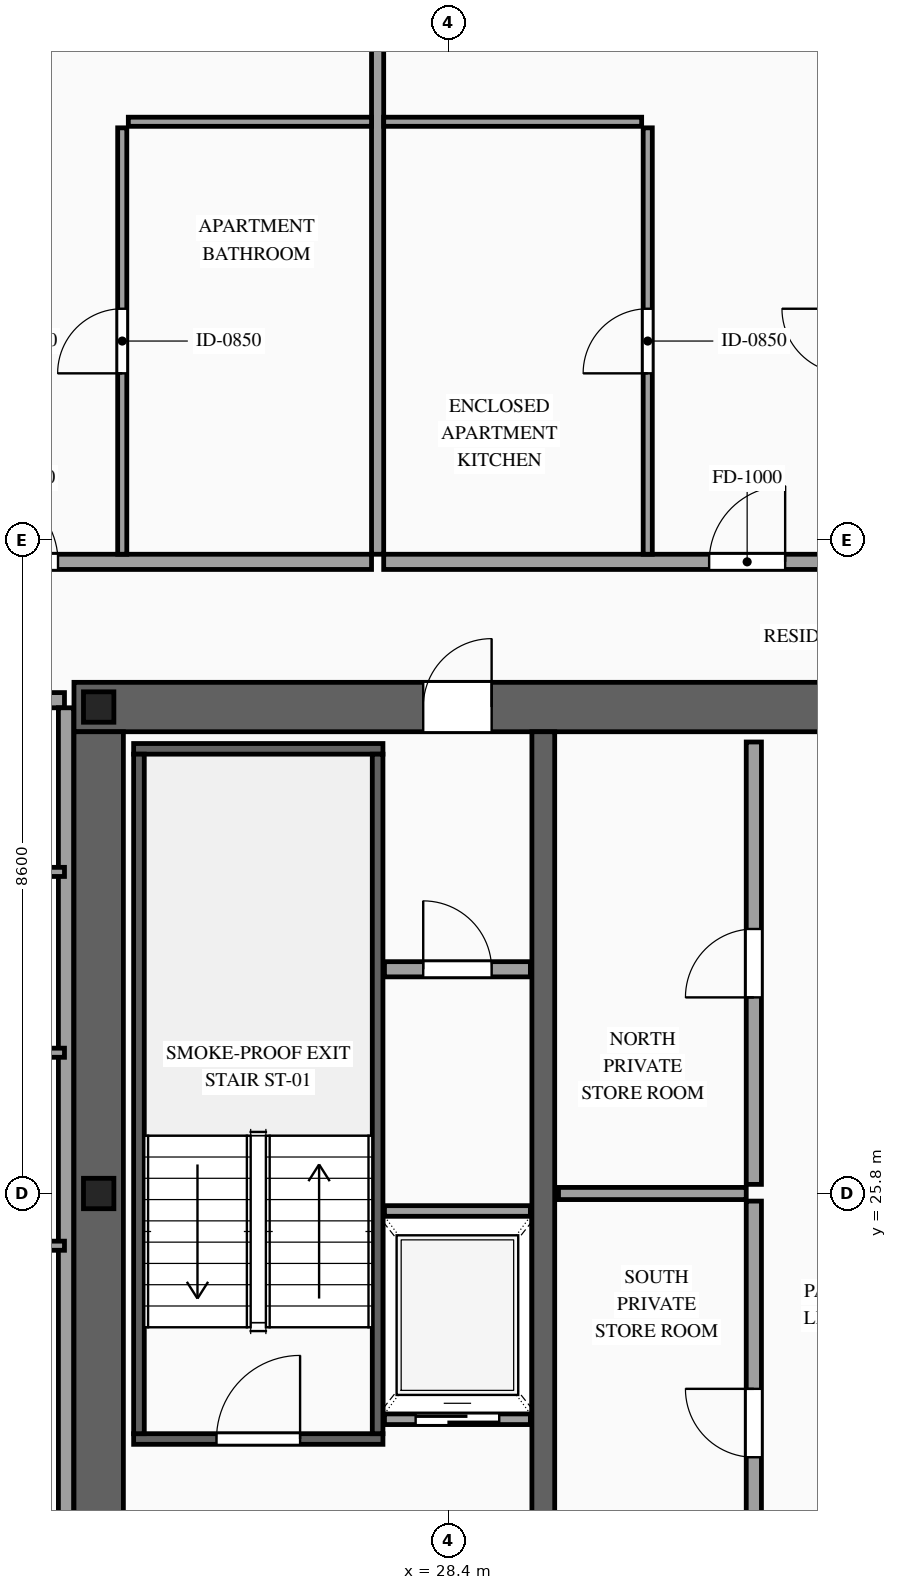
"""IFC4 building model, lengths in metres.
Left out: names, types, materials, properties, quantities, classifications, styles, units other than length and angle.
Written with IfcOpenShell. Run it as: python <this file> out.ifc"""

import sys

from ifc_helpers import new_model, si_unit, direction, frame, frame_2d, origin, origin_2d, place, context, subcontext, project, spatial, rectangle, i_section, extrude, source, transform, mapped, element, fill, save


model = new_model("IFC4")
c1 = context("Model", 3, precision=1e-05, world=origin(), true_north=direction((0.0, 1.0)))
c2 = subcontext(c1, "Body", "Model", "MODEL_VIEW")
j1 = project(units=[si_unit("LENGTHUNIT", "METRE"), si_unit("PLANEANGLEUNIT", "RADIAN")], contexts=[c1])
p1 = place(None, origin())
s1 = spatial("IfcSite", under=j1, at=p1, CompositionType="ELEMENT")
p2 = place(p1, origin())
s2 = spatial("IfcBuilding", under=s1, at=p2, CompositionType="ELEMENT")
p3 = place(p2, frame((0.0, 0.0, 184.5)))
s3 = spatial("IfcBuildingStorey", under=s2, at=p3, CompositionType="ELEMENT", Elevation=184.5)
p4 = place(p3, frame((23.475, 32.2, 0.0), z_axis=(0.0, 0.0, 1.0), x_axis=(1.0, 0.0, 0.0)))
e1 = element("IfcWall", 1, at=p4, inside=s3, PredefinedType="SHEAR", context=c2, shape_type="SweptSolid", body=[
    extrude(rectangle(XDim=27.05, YDim=0.65, at=frame_2d((13.525, 0.0))), origin(), (0.0, 0.0, 1.0), 3.5),
])
p5 = place(p4, frame((4.595, 0.0, 0.0)))
e2 = element("IfcOpeningElement", 2, at=p5, cuts=e1, PredefinedType="OPENING", context=c2, shape_type="SweptSolid", body=[
    extrude(rectangle(XDim=0.9, YDim=2.15, at=frame_2d((0.45, 1.075))), frame((0.0, 0.34, 0.0), z_axis=(0.0, -1.0, 0.0), x_axis=(1.0, 0.0, 0.0)), (0.0, 0.0, 1.0), 0.68),
])
p6 = place(p4, frame((9.875, 0.0, 0.0)))
e3 = element("IfcOpeningElement", 3, at=p6, cuts=e1, PredefinedType="OPENING", context=c2, shape_type="SweptSolid", body=[
    extrude(rectangle(XDim=1.1, YDim=2.2, at=frame_2d((0.55, 1.1))), frame((0.0, 0.34, 0.0), z_axis=(0.0, -1.0, 0.0), x_axis=(1.0, 0.0, 0.0)), (0.0, 0.0, 1.0), 0.68),
])
p7 = place(p4, frame((15.725, 0.0, 0.0)))
e4 = element("IfcOpeningElement", 4, at=p7, cuts=e1, PredefinedType="OPENING", context=c2, shape_type="SweptSolid", body=[
    extrude(rectangle(XDim=1.1, YDim=2.2, at=frame_2d((0.55, 1.1))), frame((0.0, 0.34, 0.0), z_axis=(0.0, -1.0, 0.0), x_axis=(1.0, 0.0, 0.0)), (0.0, 0.0, 1.0), 0.68),
])
p8 = place(p4, frame((19.695, 0.0, 0.0)))
e5 = element("IfcOpeningElement", 5, at=p8, cuts=e1, PredefinedType="OPENING", context=c2, shape_type="SweptSolid", body=[
    extrude(rectangle(XDim=0.9, YDim=2.15, at=frame_2d((0.45, 1.075))), frame((0.0, 0.34, 0.0), z_axis=(0.0, -1.0, 0.0), x_axis=(1.0, 0.0, 0.0)), (0.0, 0.0, 1.0), 0.68),
])
m1 = source(origin(), c2, "Body", "SweptSolid", [
    extrude(rectangle(XDim=12.15, YDim=0.65, at=frame_2d((6.075, 0.0))), origin(), (0.0, 0.0, 1.0), 3.5),
])
p9 = place(p3, frame((23.8, 19.725, 0.0), z_axis=(0.0, 0.0, 1.0), x_axis=(0.0, 1.0, 0.0)))
e6 = element("IfcWall", 6, at=p9, inside=s3, PredefinedType="SHEAR", context=c2, shape_type="MappedRepresentation", body=[
    mapped(m1, transform((0.0, 0.0, 0.0), scale=1.0)),
])
m2 = source(origin(), c2, "Body", "SweptSolid", [
    extrude(rectangle(XDim=12.15, YDim=0.3, at=frame_2d((6.075, 0.0))), origin(), (0.0, 0.0, 1.0), 3.5),
])
p10 = place(p3, frame((29.65, 19.725, 0.0), z_axis=(0.0, 0.0, 1.0), x_axis=(0.0, 1.0, 0.0)))
e7 = element("IfcWall", 7, at=p10, inside=s3, PredefinedType="SOLIDWALL", context=c2, shape_type="MappedRepresentation", body=[
    mapped(m2, transform((0.0, 0.0, 0.0), scale=1.0)),
])
m3 = source(origin(), c2, "Body", "SweptSolid", [
    extrude(i_section(OverallWidth=0.4, OverallDepth=0.4, WebThickness=0.013, FlangeThickness=0.021, at=origin_2d()), origin(), (0.0, 0.0, 1.0), 3.5),
])
for number, where, z_axis, x_axis in (
    (8, (23.8, 25.8, 0.0), (0.0, 0.0, 1.0), (1.0, 0.0, 0.0)),
    (9, (23.8, 32.2, 0.0), (0.0, 0.0, 1.0), (1.0, 0.0, 0.0)),
):
    element("IfcColumn", number, at=place(p3, frame(where, z_axis=z_axis, x_axis=x_axis)), inside=s3, PredefinedType="COLUMN", context=c2, shape_type="MappedRepresentation", body=[
        mapped(m3, transform((0.0, 0.0, 0.0), scale=1.0)),
    ])
p11 = place(p3, frame((27.56, 22.83, 0.0), z_axis=(0.0, 0.0, 1.0), x_axis=(1.0, 0.0, 0.0)))
e10 = element("IfcWall", 10, at=p11, inside=s3, PredefinedType="SOLIDWALL", context=c2, shape_type="SweptSolid", body=[
    extrude(rectangle(XDim=1.92, YDim=0.14, at=frame_2d((0.96, 0.0))), origin(), (0.0, 0.0, 1.0), 3.28),
])
p12 = place(p11, frame((0.41, 0.0, 0.0)))
e11 = element("IfcOpeningElement", 11, at=p12, cuts=e10, PredefinedType="OPENING", context=c2, shape_type="SweptSolid", body=[
    extrude(rectangle(XDim=1.1, YDim=2.2, at=frame_2d((0.55, 1.1))), frame((0.0, 0.085, 0.0), z_axis=(0.0, -1.0, 0.0), x_axis=(1.0, 0.0, 0.0)), (0.0, 0.0, 1.0), 0.17),
])
m4 = source(origin(), c2, "Body", "SweptSolid", [
    extrude(rectangle(XDim=1.92, YDim=0.14, at=frame_2d((0.96, 0.0))), origin(), (0.0, 0.0, 1.0), 3.28),
])
p13 = place(p3, frame((27.56, 25.57, 0.0), z_axis=(0.0, 0.0, 1.0), x_axis=(1.0, 0.0, 0.0)))
e12 = element("IfcWall", 12, at=p13, inside=s3, PredefinedType="SOLIDWALL", context=c2, shape_type="MappedRepresentation", body=[
    mapped(m4, transform((0.0, 0.0, 0.0), scale=1.0)),
])
p14 = place(p3, frame((24.26, 22.57, 0.0), z_axis=(0.0, 0.0, 1.0), x_axis=(1.0, 0.0, 0.0)))
e13 = element("IfcWall", 13, at=p14, inside=s3, PredefinedType="SOLIDWALL", context=c2, shape_type="SweptSolid", body=[
    extrude(rectangle(XDim=3.28, YDim=0.14, at=frame_2d((1.64, 0.0))), origin(), (0.0, 0.0, 1.0), 3.28),
])
p15 = place(p14, frame((1.09, 0.0, 0.0)))
e14 = element("IfcOpeningElement", 14, at=p15, cuts=e13, PredefinedType="OPENING", context=c2, shape_type="SweptSolid", body=[
    extrude(rectangle(XDim=1.1, YDim=2.2, at=frame_2d((0.55, 1.1))), frame((0.0, 0.085, 0.0), z_axis=(0.0, -1.0, 0.0), x_axis=(1.0, 0.0, 0.0)), (0.0, 0.0, 1.0), 0.17),
])
m5 = source(origin(), c2, "Body", "SweptSolid", [
    extrude(rectangle(XDim=3.28, YDim=0.14, at=frame_2d((1.64, 0.0))), origin(), (0.0, 0.0, 1.0), 3.28),
])
p16 = place(p3, frame((24.26, 31.65, 0.0), z_axis=(0.0, 0.0, 1.0), x_axis=(1.0, 0.0, 0.0)))
e15 = element("IfcWall", 15, at=p16, inside=s3, PredefinedType="SOLIDWALL", context=c2, shape_type="MappedRepresentation", body=[
    mapped(m5, transform((0.0, 0.0, 0.0), scale=1.0)),
])
m6 = source(origin(), c2, "Body", "SweptSolid", [
    extrude(rectangle(XDim=8.94, YDim=0.14, at=frame_2d((4.47, 0.0))), origin(), (0.0, 0.0, 1.0), 3.28),
])
for number, where, z_axis, x_axis in (
    (16, (24.33, 22.64, 0.0), (0.0, 0.0, 1.0), (0.0, 1.0, 0.0)),
    (17, (27.47, 22.64, 0.0), (0.0, 0.0, 1.0), (0.0, 1.0, 0.0)),
):
    element("IfcWall", number, at=place(p3, frame(where, z_axis=z_axis, x_axis=x_axis)), inside=s3, PredefinedType="SOLIDWALL", context=c2, shape_type="MappedRepresentation", body=[
        mapped(m6, transform((0.0, 0.0, 0.0), scale=1.0)),
    ])
p17 = place(p3, frame((27.56, 28.75, 0.0), z_axis=(0.0, 0.0, 1.0), x_axis=(1.0, 0.0, 0.0)))
e18 = element("IfcWall", 18, at=p17, inside=s3, PredefinedType="PARTITIONING", context=c2, shape_type="SweptSolid", body=[
    extrude(rectangle(XDim=1.92, YDim=0.2, at=frame_2d((0.96, 0.0))), origin(), (0.0, 0.0, 1.0), 3.28),
])
p18 = place(p17, frame((0.51, 0.0, 0.0)))
e19 = element("IfcOpeningElement", 19, at=p18, cuts=e18, PredefinedType="OPENING", context=c2, shape_type="SweptSolid", body=[
    extrude(rectangle(XDim=0.9, YDim=2.15, at=frame_2d((0.45, 1.075))), frame((0.0, 0.115, 0.0), z_axis=(0.0, -1.0, 0.0), x_axis=(1.0, 0.0, 0.0)), (0.0, 0.0, 1.0), 0.23),
])
p19 = place(p3, frame((32.42, 19.86, 0.0), z_axis=(0.0, 0.0, 1.0), x_axis=(0.0, 1.0, 0.0)))
e20 = element("IfcWall", 20, at=p19, inside=s3, PredefinedType="PARTITIONING", context=c2, shape_type="SweptSolid", body=[
    extrude(rectangle(XDim=5.84, YDim=0.2, at=frame_2d((2.92, 0.0))), origin(), (0.0, 0.0, 1.0), 3.28),
])
p20 = place(p19, frame((2.47, 0.0, 0.0)))
e21 = element("IfcOpeningElement", 21, at=p20, cuts=e20, PredefinedType="OPENING", context=c2, shape_type="SweptSolid", body=[
    extrude(rectangle(XDim=0.9, YDim=2.15, at=frame_2d((0.45, 1.075))), frame((0.0, 0.115, 0.0), z_axis=(0.0, -1.0, 0.0), x_axis=(1.0, 0.0, 0.0)), (0.0, 0.0, 1.0), 0.23),
])
p21 = place(p3, frame((32.42, 25.92, 0.0), z_axis=(0.0, 0.0, 1.0), x_axis=(0.0, 1.0, 0.0)))
e22 = element("IfcWall", 22, at=p21, inside=s3, PredefinedType="PARTITIONING", context=c2, shape_type="SweptSolid", body=[
    extrude(rectangle(XDim=5.82, YDim=0.2, at=frame_2d((2.91, 0.0))), origin(), (0.0, 0.0, 1.0), 3.28),
])
p22 = place(p21, frame((2.46, 0.0, 0.0)))
e23 = element("IfcOpeningElement", 23, at=p22, cuts=e22, PredefinedType="OPENING", context=c2, shape_type="SweptSolid", body=[
    extrude(rectangle(XDim=0.9, YDim=2.15, at=frame_2d((0.45, 1.075))), frame((0.0, 0.115, 0.0), z_axis=(0.0, -1.0, 0.0), x_axis=(1.0, 0.0, 0.0)), (0.0, 0.0, 1.0), 0.23),
])
m7 = source(origin(), c2, "Body", "SweptSolid", [
    extrude(rectangle(XDim=2.47, YDim=0.16, at=frame_2d((1.235, 0.0))), origin(), (0.0, 0.0, 1.0), 3.28),
])
p23 = place(p3, frame((29.85, 25.8, 0.0), z_axis=(0.0, 0.0, 1.0), x_axis=(1.0, 0.0, 0.0)))
e24 = element("IfcWall", 24, at=p23, inside=s3, PredefinedType="PARTITIONING", context=c2, shape_type="MappedRepresentation", body=[
    mapped(m7, transform((0.0, 0.0, 0.0), scale=1.0)),
])
p24 = place(p3, frame((17.94, 34.11, 0.0), z_axis=(0.0, 0.0, 1.0), x_axis=(1.0, 0.0, 0.0)))
e25 = element("IfcWall", 25, at=p24, inside=s3, PredefinedType="PARTITIONING", context=c2, shape_type="SweptSolid", body=[
    extrude(rectangle(XDim=9.45, YDim=0.2, at=frame_2d((4.725, 0.0))), origin(), (0.0, 0.0, 1.0), 3.28),
])
p25 = place(p24, frame((4.325, 0.0, 0.0)))
e26 = element("IfcOpeningElement", 26, at=p25, cuts=e25, PredefinedType="OPENING", context=c2, shape_type="SweptSolid", body=[
    extrude(rectangle(XDim=1.0, YDim=2.2, at=frame_2d((0.5, 1.1))), frame((0.0, 0.115, 0.0), z_axis=(0.0, -1.0, 0.0), x_axis=(1.0, 0.0, 0.0)), (0.0, 0.0, 1.0), 0.23),
])
m8 = source(origin(), c2, "Body", "SweptSolid", [
    extrude(rectangle(XDim=13.54, YDim=0.16, at=frame_2d((6.77, 0.0))), origin(), (0.0, 0.0, 1.0), 3.28),
])
p26 = place(p3, frame((27.47, 34.21, 0.0), z_axis=(0.0, 0.0, 1.0), x_axis=(0.0, 1.0, 0.0)))
e27 = element("IfcWall", 27, at=p26, inside=s3, PredefinedType="PARTITIONING", context=c2, shape_type="MappedRepresentation", body=[
    mapped(m8, transform((0.0, 0.0, 0.0), scale=1.0)),
])
m9 = source(origin(), c2, "Body", "SweptSolid", [
    extrude(rectangle(XDim=3.2, YDim=0.12, at=frame_2d((1.6, 0.0))), origin(), (0.0, 0.0, 1.0), 2.875),
])
p27 = place(p3, frame((24.19, 39.9, 0.0), z_axis=(0.0, 0.0, 1.0), x_axis=(1.0, 0.0, 0.0)))
e28 = element("IfcWall", 28, at=p27, inside=s3, PredefinedType="PARTITIONING", context=c2, shape_type="MappedRepresentation", body=[
    mapped(m9, transform((0.0, 0.0, 0.0), scale=1.0)),
])
p28 = place(p3, frame((24.11, 34.21, 0.0), z_axis=(0.0, 0.0, 1.0), x_axis=(0.0, 1.0, 0.0)))
e29 = element("IfcWall", 29, at=p28, inside=s3, PredefinedType="PARTITIONING", context=c2, shape_type="SweptSolid", body=[
    extrude(rectangle(XDim=5.61, YDim=0.12, at=frame_2d((2.805, 0.0))), origin(), (0.0, 0.0, 1.0), 3.28),
])
p29 = place(p28, frame((2.38, 0.0, 0.0)))
e30 = element("IfcOpeningElement", 30, at=p29, cuts=e29, PredefinedType="OPENING", context=c2, shape_type="SweptSolid", body=[
    extrude(rectangle(XDim=0.85, YDim=2.1, at=frame_2d((0.425, 1.05))), frame((0.0, 0.075, 0.0), z_axis=(0.0, -1.0, 0.0), x_axis=(1.0, 0.0, 0.0)), (0.0, 0.0, 1.0), 0.15),
])
p30 = place(p3, frame((27.55, 34.11, 0.0), z_axis=(0.0, 0.0, 1.0), x_axis=(1.0, 0.0, 0.0)))
e31 = element("IfcWall", 31, at=p30, inside=s3, PredefinedType="PARTITIONING", context=c2, shape_type="SweptSolid", body=[
    extrude(rectangle(XDim=9.37, YDim=0.2, at=frame_2d((4.685, 0.0))), origin(), (0.0, 0.0, 1.0), 3.28),
])
p31 = place(p30, frame((4.282, 0.0, 0.0)))
e32 = element("IfcOpeningElement", 32, at=p31, cuts=e31, PredefinedType="OPENING", context=c2, shape_type="SweptSolid", body=[
    extrude(rectangle(XDim=1.0, YDim=2.2, at=frame_2d((0.5, 1.1))), frame((0.0, 0.115, 0.0), z_axis=(0.0, -1.0, 0.0), x_axis=(1.0, 0.0, 0.0)), (0.0, 0.0, 1.0), 0.23),
])
m10 = source(origin(), c2, "Body", "SweptSolid", [
    extrude(rectangle(XDim=3.394, YDim=0.12, at=frame_2d((1.697, 0.0))), origin(), (0.0, 0.0, 1.0), 2.875),
])
p32 = place(p3, frame((27.55, 39.9, 0.0), z_axis=(0.0, 0.0, 1.0), x_axis=(1.0, 0.0, 0.0)))
e33 = element("IfcWall", 33, at=p32, inside=s3, PredefinedType="PARTITIONING", context=c2, shape_type="MappedRepresentation", body=[
    mapped(m10, transform((0.0, 0.0, 0.0), scale=1.0)),
])
p33 = place(p3, frame((31.024, 34.21, 0.0), z_axis=(0.0, 0.0, 1.0), x_axis=(0.0, 1.0, 0.0)))
e34 = element("IfcWall", 34, at=p33, inside=s3, PredefinedType="PARTITIONING", context=c2, shape_type="SweptSolid", body=[
    extrude(rectangle(XDim=5.61, YDim=0.12, at=frame_2d((2.805, 0.0))), origin(), (0.0, 0.0, 1.0), 3.28),
])
p34 = place(p33, frame((2.38, 0.0, 0.0)))
e35 = element("IfcOpeningElement", 35, at=p34, cuts=e34, PredefinedType="OPENING", context=c2, shape_type="SweptSolid", body=[
    extrude(rectangle(XDim=0.85, YDim=2.1, at=frame_2d((0.425, 1.05))), frame((0.0, 0.075, 0.0), z_axis=(0.0, -1.0, 0.0), x_axis=(1.0, 0.0, 0.0)), (0.0, 0.0, 1.0), 0.15),
])
p35 = place(p3, frame((15.05, 32.29, 0.0), z_axis=(0.0, 0.0, 1.0), x_axis=(1.0, 0.0, 0.0)))
e36 = element("IfcWall", 36, at=p35, inside=s3, PredefinedType="PARTITIONING", context=c2, shape_type="SweptSolid", body=[
    extrude(rectangle(XDim=8.3, YDim=0.2, at=frame_2d((4.15, 0.0))), origin(), (0.0, 0.0, 1.0), 2.775),
])
p36 = place(p35, frame((3.715, 0.0, 0.0)))
e37 = element("IfcOpeningElement", 37, at=p36, cuts=e36, PredefinedType="OPENING", context=c2, shape_type="SweptSolid", body=[
    extrude(rectangle(XDim=1.0, YDim=2.2, at=frame_2d((0.5, 1.1))), frame((0.0, 0.115, 0.0), z_axis=(0.0, -1.0, 0.0), x_axis=(1.0, 0.0, 0.0)), (0.0, 0.0, 1.0), 0.23),
])
m11 = source(origin(), c2, "Body", "SweptSolid", [
    extrude(rectangle(XDim=12.78, YDim=0.2, at=frame_2d((6.39, 0.0))), origin(), (0.0, 0.0, 1.0), 3.28),
])
p37 = place(p3, frame((23.37, 19.41, 0.0), z_axis=(0.0, 0.0, 1.0), x_axis=(0.0, 1.0, 0.0)))
e38 = element("IfcWall", 38, at=p37, inside=s3, PredefinedType="PARTITIONING", context=c2, shape_type="MappedRepresentation", body=[
    mapped(m11, transform((0.0, 0.0, 0.0), scale=1.0)),
])
m12 = source(origin(), c2, "Body", "SweptSolid", [
    extrude(rectangle(XDim=2.75, YDim=0.12, at=frame_2d((1.375, 0.0))), origin(), (0.0, 0.0, 1.0), 3.28),
])
for number, where, z_axis, x_axis in (
    (39, (20.6, 25.113, 0.0), (0.0, 0.0, 1.0), (1.0, 0.0, 0.0)),
    (40, (20.6, 27.652, 0.0), (0.0, 0.0, 1.0), (1.0, 0.0, 0.0)),
    (41, (20.6, 30.031, 0.0), (0.0, 0.0, 1.0), (1.0, 0.0, 0.0)),
):
    element("IfcWall", number, at=place(p3, frame(where, z_axis=z_axis, x_axis=x_axis)), inside=s3, PredefinedType="PARTITIONING", context=c2, shape_type="MappedRepresentation", body=[
        mapped(m12, transform((0.0, 0.0, 0.0), scale=1.0)),
    ])
m13 = source(origin(), c2, "Body", "SweptSolid", [
    extrude(rectangle(XDim=1.1, YDim=2.2, at=frame_2d((0.55, 1.1))), frame((0.0, 0.025, 0.0), z_axis=(0.0, -1.0, 0.0), x_axis=(1.0, 0.0, 0.0)), (0.0, 0.0, 1.0), 0.05),
])
p38 = place(p12, origin())
e42 = element("IfcDoor", 42, at=p38, inside=s3, OperationType="SLIDING_TO_LEFT", PredefinedType="DOOR", context=c2, shape_type="MappedRepresentation", body=[
    mapped(m13, transform((0.0, 0.0, 0.0), scale=1.0)),
])
fill(e11, e42)
m14 = source(origin(), c2, "Body", "SweptSolid", [
    extrude(rectangle(XDim=1.1, YDim=2.2, at=frame_2d((0.55, 1.1))), frame((0.0, 0.025, 0.0), z_axis=(0.0, -1.0, 0.0), x_axis=(1.0, 0.0, 0.0)), (0.0, 0.0, 1.0), 0.05),
])
p39 = place(p15, origin())
e43 = element("IfcDoor", 43, at=p39, inside=s3, OperationType="SINGLE_SWING_RIGHT", PredefinedType="DOOR", context=c2, shape_type="MappedRepresentation", body=[
    mapped(m14, transform((0.0, 0.0, 0.0), scale=1.0)),
])
fill(e14, e43)
m15 = source(origin(), c2, "Body", "SweptSolid", [
    extrude(rectangle(XDim=0.9, YDim=2.15, at=frame_2d((0.45, 1.075))), frame((0.0, 0.025, 0.0), z_axis=(0.0, -1.0, 0.0), x_axis=(1.0, 0.0, 0.0)), (0.0, 0.0, 1.0), 0.05),
])
p40 = place(p5, origin())
e44 = element("IfcDoor", 44, at=p40, inside=s3, OperationType="SINGLE_SWING_RIGHT", PredefinedType="DOOR", context=c2, shape_type="MappedRepresentation", body=[
    mapped(m15, transform((0.0, 0.0, 0.0), scale=1.0)),
])
fill(e2, e44)
p41 = place(p18, origin())
e45 = element("IfcDoor", 45, at=p41, inside=s3, OperationType="SINGLE_SWING_LEFT", PredefinedType="DOOR", context=c2, shape_type="MappedRepresentation", body=[
    mapped(m15, transform((0.0, 0.0, 0.0), scale=1.0)),
])
fill(e19, e45)
p42 = place(p20, origin())
e46 = element("IfcDoor", 46, at=p42, inside=s3, OperationType="SINGLE_SWING_RIGHT", PredefinedType="DOOR", context=c2, shape_type="MappedRepresentation", body=[
    mapped(m15, transform((0.0, 0.0, 0.0), scale=1.0)),
])
fill(e21, e46)
p43 = place(p22, origin())
e47 = element("IfcDoor", 47, at=p43, inside=s3, OperationType="SINGLE_SWING_LEFT", PredefinedType="DOOR", context=c2, shape_type="MappedRepresentation", body=[
    mapped(m15, transform((0.0, 0.0, 0.0), scale=1.0)),
])
fill(e23, e47)
m16 = source(origin(), c2, "Body", "SweptSolid", [
    extrude(rectangle(XDim=1.0, YDim=2.2, at=frame_2d((0.5, 1.1))), frame((0.0, 0.025, 0.0), z_axis=(0.0, -1.0, 0.0), x_axis=(1.0, 0.0, 0.0)), (0.0, 0.0, 1.0), 0.05),
])
p44 = place(p25, origin())
e48 = element("IfcDoor", 48, at=p44, inside=s3, OperationType="SINGLE_SWING_LEFT", PredefinedType="DOOR", context=c2, shape_type="MappedRepresentation", body=[
    mapped(m16, transform((0.0, 0.0, 0.0), scale=1.0)),
])
fill(e26, e48)
m17 = source(origin(), c2, "Body", "SweptSolid", [
    extrude(rectangle(XDim=0.85, YDim=2.1, at=frame_2d((0.425, 1.05))), frame((0.0, 0.025, 0.0), z_axis=(0.0, -1.0, 0.0), x_axis=(1.0, 0.0, 0.0)), (0.0, 0.0, 1.0), 0.05),
])
p45 = place(p29, origin())
e49 = element("IfcDoor", 49, at=p45, inside=s3, OperationType="SINGLE_SWING_LEFT", PredefinedType="DOOR", context=c2, shape_type="MappedRepresentation", body=[
    mapped(m17, transform((0.0, 0.0, 0.0), scale=1.0)),
])
fill(e30, e49)
p46 = place(p31, origin())
e50 = element("IfcDoor", 50, at=p46, inside=s3, OperationType="SINGLE_SWING_RIGHT", PredefinedType="DOOR", context=c2, shape_type="MappedRepresentation", body=[
    mapped(m16, transform((0.0, 0.0, 0.0), scale=1.0)),
])
fill(e32, e50)
p47 = place(p34, origin())
e51 = element("IfcDoor", 51, at=p47, inside=s3, OperationType="SINGLE_SWING_LEFT", PredefinedType="DOOR", context=c2, shape_type="MappedRepresentation", body=[
    mapped(m17, transform((0.0, 0.0, 0.0), scale=1.0)),
])
fill(e35, e51)
save(model, sys.argv[1])
